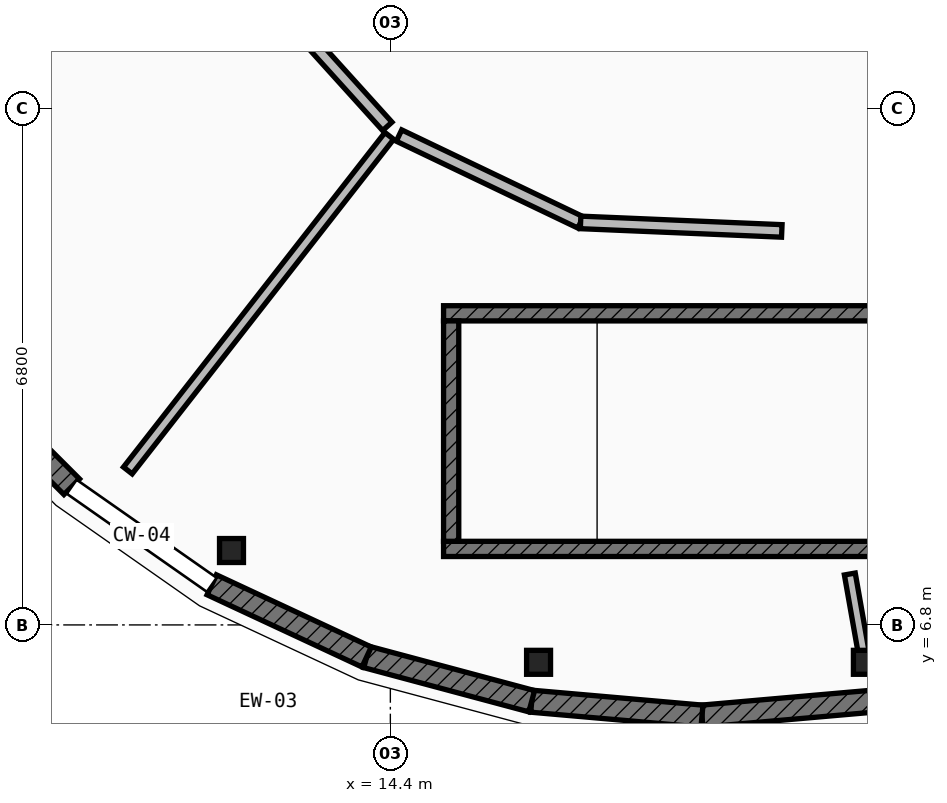
"""IFC4 building model, lengths in metres.
Left out: names, types, materials, properties, quantities, classifications, styles, units other than length and angle.
Written with IfcOpenShell. Run it as: python <this file> out.ifc"""

import sys

from ifc_helpers import new_model, si_unit, direction, frame, frame_2d, origin, origin_2d, place, context, subcontext, project, spatial, rectangle, extrude, element, fill, save


model = new_model("IFC4")
c1 = context("Model", 3, precision=1e-05, world=origin(), true_north=direction((0.0, 1.0)))
c2 = subcontext(c1, "Body", "Model", "MODEL_VIEW")
j1 = project(units=[si_unit("LENGTHUNIT", "METRE"), si_unit("PLANEANGLEUNIT", "RADIAN")], contexts=[c1])
p1 = place(None, origin())
s1 = spatial("IfcSite", under=j1, at=p1, CompositionType="ELEMENT")
p2 = place(p1, origin())
s2 = spatial("IfcBuilding", under=s1, at=p2, CompositionType="ELEMENT")
p3 = place(p2, frame((0.0, 0.0, 12.95)))
s3 = spatial("IfcBuildingStorey", under=s2, at=p3, CompositionType="ELEMENT", Elevation=12.95)
for number, where, z_axis, x_axis in (
    (1, (12.31, 7.779, 0.0), (0.0, 0.0, 1.0), (1.0, 0.0, 0.0)),
    (2, (16.35, 6.308, 0.0), (0.0, 0.0, 1.0), (1.0, 0.0, 0.0)),
    (3, (20.65, 6.308, 0.0), (0.0, 0.0, 1.0), (1.0, 0.0, 0.0)),
):
    element("IfcColumn", number, at=place(p3, frame(where, z_axis=z_axis, x_axis=x_axis)), inside=s3, PredefinedType="COLUMN", context=c2, shape_type="SweptSolid", body=[
        extrude(rectangle(XDim=0.315, YDim=0.315, at=origin_2d()), origin(), (0.0, 0.0, 1.0), 4.2),
    ])
for number, where, z_axis, x_axis in (
    (4, (20.74, 5.796, 0.0), (0.0, 0.0, 1.0), (-0.996, -0.087, 0.0)),
    (5, (18.5, 5.6, 0.0), (0.0, 0.0, 1.0), (-0.996, 0.087, 0.0)),
):
    element("IfcWall", number, at=place(p3, frame(where, z_axis=z_axis, x_axis=x_axis)), inside=s3, PredefinedType="ELEMENTEDWALL", context=c2, shape_type="SweptSolid", body=[
        extrude(rectangle(XDim=2.249, YDim=0.29, at=frame_2d((1.124, 0.0))), origin(), (0.0, 0.0, 1.0), 3.349),
    ])
p4 = place(p3, frame((16.26, 5.796, 0.0), z_axis=(0.0, 0.0, 1.0), x_axis=(-0.96592430538, 0.258824721145, 0.0)))
e6 = element("IfcWall", 6, at=p4, inside=s3, PredefinedType="ELEMENTEDWALL", context=c2, shape_type="SweptSolid", body=[
    extrude(rectangle(XDim=2.249, YDim=0.29, at=frame_2d((1.125, 0.0))), origin(), (0.0, 0.0, 1.0), 3.349),
])
p5 = place(p4, frame((0.649, 0.0, 0.85)))
e7 = element("IfcOpeningElement", 7, at=p5, cuts=e6, PredefinedType="OPENING", context=c2, shape_type="SweptSolid", body=[
    extrude(rectangle(XDim=0.95, YDim=2.05, at=frame_2d((0.475, 1.025))), frame((0.0, 0.155, 0.0), z_axis=(0.0, -1.0, 0.0), x_axis=(1.0, 0.0, 0.0)), (0.0, 0.0, 1.0), 0.31),
])
p6 = place(p3, frame((14.088, 6.378, 0.0), z_axis=(0.0, 0.0, 1.0), x_axis=(-0.906360600886, 0.422504983593, 0.0)))
e8 = element("IfcWall", 8, at=p6, inside=s3, PredefinedType="ELEMENTEDWALL", context=c2, shape_type="SweptSolid", body=[
    extrude(rectangle(XDim=2.248, YDim=0.29, at=frame_2d((1.124, 0.0))), origin(), (0.0, 0.0, 1.0), 3.349),
])
p7 = place(p6, frame((0.634, 0.0, 0.85)))
e9 = element("IfcOpeningElement", 9, at=p7, cuts=e8, PredefinedType="OPENING", context=c2, shape_type="SweptSolid", body=[
    extrude(rectangle(XDim=0.98, YDim=1.5, at=frame_2d((0.49, 0.75))), frame((0.0, 0.155, 0.0), z_axis=(0.0, -1.0, 0.0), x_axis=(1.0, 0.0, 0.0)), (0.0, 0.0, 1.0), 0.31),
])
p8 = place(p3, frame((10.208, 8.618, 0.0), z_axis=(0.0, 0.0, 1.0), x_axis=(-0.707106781187, 0.707106781187, 0.0)))
e10 = element("IfcWall", 10, at=p8, inside=s3, PredefinedType="ELEMENTEDWALL", context=c2, shape_type="SweptSolid", body=[
    extrude(rectangle(XDim=2.249, YDim=0.29, at=frame_2d((1.125, 0.0))), origin(), (0.0, 0.0, 1.0), 3.349),
])
p9 = place(p8, frame((0.634, 0.0, 0.85)))
e11 = element("IfcOpeningElement", 11, at=p9, cuts=e10, PredefinedType="OPENING", context=c2, shape_type="SweptSolid", body=[
    extrude(rectangle(XDim=0.98, YDim=1.75, at=frame_2d((0.49, 0.875))), frame((0.0, 0.155, 0.0), z_axis=(0.0, -1.0, 0.0), x_axis=(1.0, 0.0, 0.0)), (0.0, 0.0, 1.0), 0.31),
])
p10 = place(p3, frame((21.9, 10.9, 0.0), z_axis=(0.0, 0.0, 1.0), x_axis=(-1.0, 0.0, 0.0)))
e12 = element("IfcWall", 12, at=p10, inside=s3, PredefinedType="SHEAR", context=c2, shape_type="SweptSolid", body=[
    extrude(rectangle(XDim=6.8, YDim=0.2, at=frame_2d((3.4, 0.0))), origin(), (0.0, 0.0, 1.0), 3.995),
])
p11 = place(p10, frame((0.38, 0.0, 0.0)))
e13 = element("IfcOpeningElement", 13, at=p11, cuts=e12, PredefinedType="OPENING", context=c2, shape_type="SweptSolid", body=[
    extrude(rectangle(XDim=1.05, YDim=2.15, at=frame_2d((0.525, 1.075))), frame((0.0, 0.11, 0.0), z_axis=(0.0, -1.0, 0.0), x_axis=(1.0, 0.0, 0.0)), (0.0, 0.0, 1.0), 0.22),
])
p12 = place(p3, frame((21.9, 7.8, 0.0), z_axis=(0.0, 0.0, 1.0), x_axis=(-1.0, 0.0, 0.0)))
e14 = element("IfcWall", 14, at=p12, inside=s3, PredefinedType="SHEAR", context=c2, shape_type="SweptSolid", body=[
    extrude(rectangle(XDim=6.8, YDim=0.2, at=frame_2d((3.4, 0.0))), origin(), (0.0, 0.0, 1.0), 3.995),
])
p13 = place(p3, frame((15.2, 10.8, 0.0), z_axis=(0.0, 0.0, 1.0), x_axis=(0.0, -1.0, 0.0)))
e15 = element("IfcWall", 15, at=p13, inside=s3, PredefinedType="SHEAR", context=c2, shape_type="SweptSolid", body=[
    extrude(rectangle(XDim=2.9, YDim=0.2, at=frame_2d((1.45, 0.0))), origin(), (0.0, 0.0, 1.0), 3.995),
])
p14 = place(p3, frame((14.386, 13.234, 0.0), z_axis=(0.0, 0.0, 1.0), x_axis=(-0.615754283542, -0.787938235079, 0.0)))
e16 = element("IfcWall", 16, at=p14, inside=s3, PredefinedType="PARTITIONING", context=c2, shape_type="SweptSolid", body=[
    extrude(rectangle(XDim=5.587, YDim=0.145, at=frame_2d((2.793, 0.0))), origin(), (0.0, 0.0, 1.0), 3.324),
])
p15 = place(p3, frame((20.445, 7.47, 0.0), z_axis=(0.0, 0.0, 1.0), x_axis=(0.173759982235, -0.984788032306, 0.0)))
e17 = element("IfcWall", 17, at=p15, inside=s3, PredefinedType="PARTITIONING", context=c2, shape_type="SweptSolid", body=[
    extrude(rectangle(XDim=1.099, YDim=0.145, at=frame_2d((0.549, 0.0))), origin(), (0.0, 0.0, 1.0), 3.324),
])
p16 = place(p3, frame((12.968, 14.901, 0.0), z_axis=(0.0, 0.0, 1.0), x_axis=(0.670399039083, -0.742000760374, 0.0)))
e18 = element("IfcWall", 18, at=p16, inside=s3, PredefinedType="PARTITIONING", context=c2, shape_type="SweptSolid", body=[
    extrude(rectangle(XDim=2.076, YDim=0.165, at=frame_2d((1.038, 0.0))), origin(), (0.0, 0.0, 1.0), 3.324),
])
p17 = place(p16, frame((0.363, 0.0, 0.0)))
e19 = element("IfcOpeningElement", 19, at=p17, cuts=e18, PredefinedType="OPENING", context=c2, shape_type="SweptSolid", body=[
    extrude(rectangle(XDim=1.35, YDim=2.22, at=frame_2d((0.675, 1.11))), frame((0.0, 0.093, 0.0), z_axis=(0.0, -1.0, 0.0), x_axis=(1.0, 0.0, 0.0)), (0.0, 0.0, 1.0), 0.185),
])
p18 = place(p3, frame((14.514, 13.239, 0.0), z_axis=(0.0, 0.0, 1.0), x_axis=(0.902071813547, -0.431585962705, 0.0)))
e20 = element("IfcWall", 20, at=p18, inside=s3, PredefinedType="PARTITIONING", context=c2, shape_type="SweptSolid", body=[
    extrude(rectangle(XDim=2.648, YDim=0.165, at=frame_2d((1.324, 0.0))), origin(), (0.0, 0.0, 1.0), 3.324),
])
p19 = place(p18, frame((0.829, 0.0, 0.0)))
e21 = element("IfcOpeningElement", 21, at=p19, cuts=e20, PredefinedType="OPENING", context=c2, shape_type="SweptSolid", body=[
    extrude(rectangle(XDim=0.99, YDim=2.22, at=frame_2d((0.495, 1.11))), frame((0.0, 0.093, 0.0), z_axis=(0.0, -1.0, 0.0), x_axis=(1.0, 0.0, 0.0)), (0.0, 0.0, 1.0), 0.185),
])
p20 = place(p3, frame((16.903, 12.096, 0.0), z_axis=(0.0, 0.0, 1.0), x_axis=(0.99910506135, -0.042297474927, 0.0)))
e22 = element("IfcWall", 22, at=p20, inside=s3, PredefinedType="PARTITIONING", context=c2, shape_type="SweptSolid", body=[
    extrude(rectangle(XDim=2.649, YDim=0.165, at=frame_2d((1.325, 0.0))), origin(), (0.0, 0.0, 1.0), 3.324),
])
p21 = place(p5, origin())
e23 = element("IfcWindow", 23, at=p21, inside=s3, PartitioningType="SINGLE_PANEL", PredefinedType="WINDOW", context=c2, shape_type="SweptSolid", body=[
    extrude(rectangle(XDim=0.95, YDim=2.05, at=frame_2d((0.475, 1.025))), frame((0.0, 0.03, 0.0), z_axis=(0.0, -1.0, 0.0), x_axis=(1.0, 0.0, 0.0)), (0.0, 0.0, 1.0), 0.06),
])
fill(e7, e23)
p22 = place(p7, origin())
e24 = element("IfcWindow", 24, at=p22, inside=s3, PartitioningType="SINGLE_PANEL", PredefinedType="WINDOW", context=c2, shape_type="SweptSolid", body=[
    extrude(rectangle(XDim=0.98, YDim=1.5, at=frame_2d((0.49, 0.75))), frame((0.0, 0.03, 0.0), z_axis=(0.0, -1.0, 0.0), x_axis=(1.0, 0.0, 0.0)), (0.0, 0.0, 1.0), 0.06),
])
fill(e9, e24)
p23 = place(p11, origin())
e25 = element("IfcDoor", 25, at=p23, inside=s3, OperationType="SINGLE_SWING_LEFT", PredefinedType="DOOR", context=c2, shape_type="SweptSolid", body=[
    extrude(rectangle(XDim=1.05, YDim=2.15, at=frame_2d((0.525, 1.075))), frame((0.0, 0.025, 0.0), z_axis=(0.0, -1.0, 0.0), x_axis=(1.0, 0.0, 0.0)), (0.0, 0.0, 1.0), 0.05),
])
fill(e13, e25)
p24 = place(p17, origin())
e26 = element("IfcDoor", 26, at=p24, inside=s3, OperationType="SINGLE_SWING_RIGHT", PredefinedType="DOOR", context=c2, shape_type="SweptSolid", body=[
    extrude(rectangle(XDim=1.35, YDim=2.22, at=frame_2d((0.675, 1.11))), frame((0.0, 0.025, 0.0), z_axis=(0.0, -1.0, 0.0), x_axis=(1.0, 0.0, 0.0)), (0.0, 0.0, 1.0), 0.05),
])
fill(e19, e26)
p25 = place(p19, origin())
e27 = element("IfcDoor", 27, at=p25, inside=s3, OperationType="SINGLE_SWING_LEFT", PredefinedType="DOOR", context=c2, shape_type="SweptSolid", body=[
    extrude(rectangle(XDim=0.99, YDim=2.22, at=frame_2d((0.495, 1.11))), frame((0.0, 0.025, 0.0), z_axis=(0.0, -1.0, 0.0), x_axis=(1.0, 0.0, 0.0)), (0.0, 0.0, 1.0), 0.05),
])
fill(e21, e27)
save(model, sys.argv[1])
